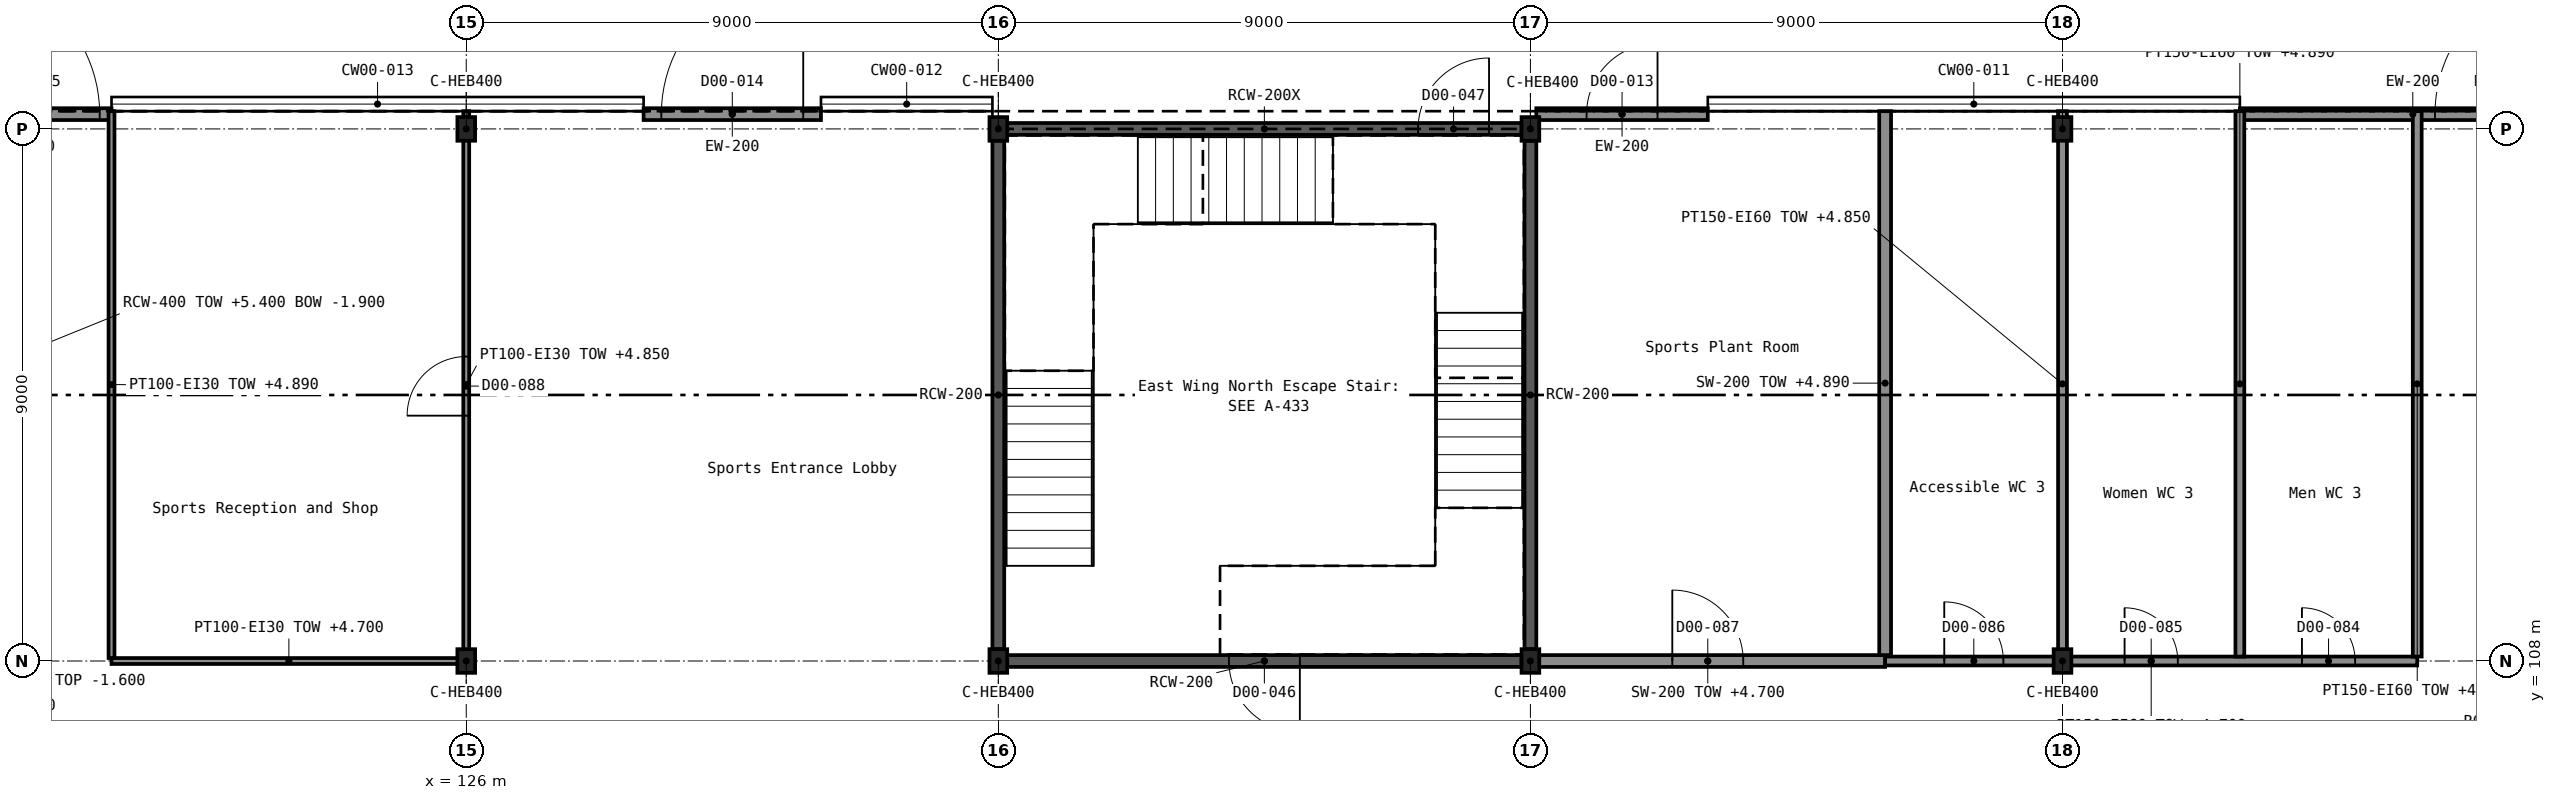
"""IFC4 building model, lengths in metres.
Left out: names, types, materials, properties, quantities, classifications, styles, units other than length and angle.
Written with IfcOpenShell. Run it as: python <this file> out.ifc"""

import sys

from ifc_helpers import new_model, si_unit, direction, frame, frame_2d, origin, origin_2d, place, context, subcontext, project, spatial, rectangle, i_section, extrude, element, fill, save


model = new_model("IFC4")
c1 = context("Model", 3, precision=1e-05, world=origin(), true_north=direction((0.0, 1.0)))
c2 = subcontext(c1, "Body", "Model", "MODEL_VIEW")
j1 = project(units=[si_unit("LENGTHUNIT", "METRE"), si_unit("PLANEANGLEUNIT", "RADIAN")], contexts=[c1])
p1 = place(None, origin())
s1 = spatial("IfcSite", under=j1, at=p1, CompositionType="ELEMENT")
p2 = place(p1, origin())
s2 = spatial("IfcBuilding", under=s1, at=p2, CompositionType="ELEMENT")
p3 = place(p2, origin())
s3 = spatial("IfcBuildingStorey", under=s2, at=p3, CompositionType="ELEMENT", Elevation=0.0)
for number, where, z_axis, x_axis in (
    (1, (126.0, 108.0, -0.3), (0.0, 0.0, 1.0), (1.0, 0.0, 0.0)),
    (2, (135.0, 108.0, -0.3), (0.0, 0.0, 1.0), (1.0, 0.0, 0.0)),
    (3, (144.0, 108.0, -0.3), (0.0, 0.0, 1.0), (1.0, 0.0, 0.0)),
    (4, (153.0, 108.0, -0.3), (0.0, 0.0, 1.0), (1.0, 0.0, 0.0)),
    (5, (126.0, 117.0, -0.3), (0.0, 0.0, 1.0), (1.0, 0.0, 0.0)),
    (6, (135.0, 117.0, -0.3), (0.0, 0.0, 1.0), (1.0, 0.0, 0.0)),
    (7, (144.0, 117.0, -0.3), (0.0, 0.0, 1.0), (1.0, 0.0, 0.0)),
    (8, (153.0, 117.0, -0.3), (0.0, 0.0, 1.0), (1.0, 0.0, 0.0)),
):
    element("IfcColumn", number, at=place(p3, frame(where, z_axis=z_axis, x_axis=x_axis)), inside=s3, PredefinedType="COLUMN", context=c2, shape_type="SweptSolid", body=[
        extrude(i_section(OverallWidth=0.3, OverallDepth=0.4, WebThickness=0.013, FlangeThickness=0.024, FilletRadius=0.027, at=origin_2d()), origin(), (0.0, 0.0, 1.0), 5.7),
    ])
p4 = place(p3, frame((161.85, 117.25, 0.0), z_axis=(0.0, 0.0, 1.0), x_axis=(-1.0, 0.0, 0.0)))
e9 = element("IfcWall", 9, at=p4, inside=s3, PredefinedType="SOLIDWALL", context=c2, shape_type="SweptSolid", body=[
    extrude(rectangle(XDim=5.85, YDim=0.2, at=frame_2d((2.925, 0.0))), origin(), (0.0, 0.0, 1.0), 5.4),
])
p5 = place(p4, frame((0.15, 0.0, 0.0)))
e10 = element("IfcOpeningElement", 10, at=p5, cuts=e9, PredefinedType="OPENING", context=c2, shape_type="SweptSolid", body=[
    extrude(rectangle(XDim=2.4, YDim=2.4, at=frame_2d((1.2, 1.2))), frame((0.0, 0.111, 0.0), z_axis=(0.0, -1.0, 0.0), x_axis=(1.0, 0.0, 0.0)), (0.0, 0.0, 1.0), 0.222),
])
p6 = place(p3, frame((147.0, 117.25, 0.0), z_axis=(0.0, 0.0, 1.0), x_axis=(-1.0, 0.0, 0.0)))
e11 = element("IfcWall", 11, at=p6, inside=s3, PredefinedType="SOLIDWALL", context=c2, shape_type="SweptSolid", body=[
    extrude(rectangle(XDim=2.9, YDim=0.2, at=frame_2d((1.45, 0.0))), origin(), (0.0, 0.0, 1.0), 5.4),
])
p7 = place(p6, frame((0.85, 0.0, 0.0)))
e12 = element("IfcOpeningElement", 12, at=p7, cuts=e11, PredefinedType="OPENING", context=c2, shape_type="SweptSolid", body=[
    extrude(rectangle(XDim=1.2, YDim=2.1, at=frame_2d((0.6, 1.05))), frame((0.0, 0.111, 0.0), z_axis=(0.0, -1.0, 0.0), x_axis=(1.0, 0.0, 0.0)), (0.0, 0.0, 1.0), 0.222),
])
p8 = place(p3, frame((132.0, 117.25, 0.0), z_axis=(0.0, 0.0, 1.0), x_axis=(-1.0, 0.0, 0.0)))
e13 = element("IfcWall", 13, at=p8, inside=s3, PredefinedType="SOLIDWALL", context=c2, shape_type="SweptSolid", body=[
    extrude(rectangle(XDim=3.0, YDim=0.2, at=frame_2d((1.5, 0.0))), origin(), (0.0, 0.0, 1.0), 5.4),
])
p9 = place(p8, frame((0.3, 0.0, 0.0)))
e14 = element("IfcOpeningElement", 14, at=p9, cuts=e13, PredefinedType="OPENING", context=c2, shape_type="SweptSolid", body=[
    extrude(rectangle(XDim=2.4, YDim=2.4, at=frame_2d((1.2, 1.2))), frame((0.0, 0.111, 0.0), z_axis=(0.0, -1.0, 0.0), x_axis=(1.0, 0.0, 0.0)), (0.0, 0.0, 1.0), 0.222),
])
p10 = place(p3, frame((120.0, 117.25, 0.0), z_axis=(0.0, 0.0, 1.0), x_axis=(-1.0, 0.0, 0.0)))
e15 = element("IfcWall", 15, at=p10, inside=s3, PredefinedType="SOLIDWALL", context=c2, shape_type="SweptSolid", body=[
    extrude(rectangle(XDim=2.8, YDim=0.2, at=frame_2d((1.4, 0.0))), origin(), (0.0, 0.0, 1.0), 5.4),
])
p11 = place(p10, frame((0.2, 0.0, 0.0)))
e16 = element("IfcOpeningElement", 16, at=p11, cuts=e15, PredefinedType="OPENING", context=c2, shape_type="SweptSolid", body=[
    extrude(rectangle(XDim=2.4, YDim=2.4, at=frame_2d((1.2, 1.2))), frame((0.0, 0.111, 0.0), z_axis=(0.0, -1.0, 0.0), x_axis=(1.0, 0.0, 0.0)), (0.0, 0.0, 1.0), 0.222),
])
p12 = place(p3, frame((135.15, 108.0, 0.0), z_axis=(0.0, 0.0, 1.0), x_axis=(1.0, 0.0, 0.0)))
e17 = element("IfcWall", 17, at=p12, inside=s3, PredefinedType="SHEAR", context=c2, shape_type="SweptSolid", body=[
    extrude(rectangle(XDim=8.7, YDim=0.2, at=frame_2d((4.35, 0.0))), origin(), (0.0, 0.0, 1.0), 5.4),
])
p13 = place(p12, frame((3.75, 0.0, 0.0)))
e18 = element("IfcOpeningElement", 18, at=p13, cuts=e17, PredefinedType="OPENING", context=c2, shape_type="SweptSolid", body=[
    extrude(rectangle(XDim=1.2, YDim=2.1, at=frame_2d((0.6, 1.05))), frame((0.0, 0.111, 0.0), z_axis=(0.0, -1.0, 0.0), x_axis=(1.0, 0.0, 0.0)), (0.0, 0.0, 1.0), 0.222),
])
p14 = place(p3, frame((135.15, 117.0, 0.0), z_axis=(0.0, 0.0, 1.0), x_axis=(1.0, 0.0, 0.0)))
e19 = element("IfcWall", 19, at=p14, inside=s3, PredefinedType="SHEAR", context=c2, shape_type="SweptSolid", body=[
    extrude(rectangle(XDim=8.7, YDim=0.2, at=frame_2d((4.35, 0.0))), origin(), (0.0, 0.0, 1.0), 5.4),
])
p15 = place(p14, frame((6.95, 0.0, 0.0)))
e20 = element("IfcOpeningElement", 20, at=p15, cuts=e19, PredefinedType="OPENING", context=c2, shape_type="SweptSolid", body=[
    extrude(rectangle(XDim=1.2, YDim=2.1, at=frame_2d((0.6, 1.05))), frame((0.0, 0.111, 0.0), z_axis=(0.0, -1.0, 0.0), x_axis=(1.0, 0.0, 0.0)), (0.0, 0.0, 1.0), 0.222),
])
for number, where, z_axis, x_axis in (
    (21, (135.0, 108.2, 0.0), (0.0, 0.0, 1.0), (0.0, 1.0, 0.0)),
    (22, (144.0, 108.2, 0.0), (0.0, 0.0, 1.0), (0.0, 1.0, 0.0)),
):
    element("IfcWall", number, at=place(p3, frame(where, z_axis=z_axis, x_axis=x_axis)), inside=s3, PredefinedType="SHEAR", context=c2, shape_type="SweptSolid", body=[
        extrude(rectangle(XDim=8.6, YDim=0.2, at=frame_2d((4.3, 0.0))), origin(), (0.0, 0.0, 1.0), 5.4),
    ])
p16 = place(p3, frame((144.0, 108.0, 0.0), z_axis=(0.0, 0.0, 1.0), x_axis=(1.0, 0.0, 0.0)))
e23 = element("IfcWall", 23, at=p16, inside=s3, PredefinedType="SOLIDWALL", context=c2, shape_type="SweptSolid", body=[
    extrude(rectangle(XDim=6.0, YDim=0.2, at=frame_2d((3.0, 0.0))), origin(), (0.0, 0.0, 1.0), 4.7),
])
p17 = place(p16, frame((2.4, 0.0, 0.0)))
e24 = element("IfcOpeningElement", 24, at=p17, cuts=e23, PredefinedType="OPENING", context=c2, shape_type="SweptSolid", body=[
    extrude(rectangle(XDim=1.2, YDim=2.4, at=frame_2d((0.6, 1.2))), frame((0.0, 0.111, 0.0), z_axis=(0.0, -1.0, 0.0), x_axis=(1.0, 0.0, 0.0)), (0.0, 0.0, 1.0), 0.222),
])
p18 = place(p3, frame((150.0, 108.1, 0.0), z_axis=(0.0, 0.0, 1.0), x_axis=(0.0, 1.0, 0.0)))
e25 = element("IfcWall", 25, at=p18, inside=s3, PredefinedType="SOLIDWALL", context=c2, shape_type="SweptSolid", body=[
    extrude(rectangle(XDim=9.2, YDim=0.2, at=frame_2d((4.6, 0.0))), origin(), (0.0, 0.0, 1.0), 4.89),
])
p19 = place(p3, frame((150.0, 108.0, 0.0), z_axis=(0.0, 0.0, 1.0), x_axis=(1.0, 0.0, 0.0)))
e26 = element("IfcWall", 26, at=p19, inside=s3, PredefinedType="PARTITIONING", context=c2, shape_type="SweptSolid", body=[
    extrude(rectangle(XDim=9.0, YDim=0.15, at=frame_2d((4.5, 0.0))), origin(), (0.0, 0.0, 1.0), 4.7),
])
p20 = place(p19, frame((7.05, 0.0, 0.0)))
e27 = element("IfcOpeningElement", 27, at=p20, cuts=e26, PredefinedType="OPENING", context=c2, shape_type="SweptSolid", body=[
    extrude(rectangle(XDim=0.9, YDim=2.1, at=frame_2d((0.45, 1.05))), frame((0.0, 0.086, 0.0), z_axis=(0.0, -1.0, 0.0), x_axis=(1.0, 0.0, 0.0)), (0.0, 0.0, 1.0), 0.172),
])
p21 = place(p19, frame((4.05, 0.0, 0.0)))
e28 = element("IfcOpeningElement", 28, at=p21, cuts=e26, PredefinedType="OPENING", context=c2, shape_type="SweptSolid", body=[
    extrude(rectangle(XDim=0.9, YDim=2.1, at=frame_2d((0.45, 1.05))), frame((0.0, 0.086, 0.0), z_axis=(0.0, -1.0, 0.0), x_axis=(1.0, 0.0, 0.0)), (0.0, 0.0, 1.0), 0.172),
])
p22 = place(p19, frame((1.0, 0.0, 0.0)))
e29 = element("IfcOpeningElement", 29, at=p22, cuts=e26, PredefinedType="OPENING", context=c2, shape_type="SweptSolid", body=[
    extrude(rectangle(XDim=1.0, YDim=2.1, at=frame_2d((0.5, 1.05))), frame((0.0, 0.086, 0.0), z_axis=(0.0, -1.0, 0.0), x_axis=(1.0, 0.0, 0.0)), (0.0, 0.0, 1.0), 0.172),
])
p23 = place(p3, frame((153.0, 108.075, 0.0), z_axis=(0.0, 0.0, 1.0), x_axis=(0.0, 1.0, 0.0)))
e30 = element("IfcWall", 30, at=p23, inside=s3, PredefinedType="PARTITIONING", context=c2, shape_type="SweptSolid", body=[
    extrude(rectangle(XDim=9.225, YDim=0.15, at=frame_2d((4.613, 0.0))), origin(), (0.0, 0.0, 1.0), 4.85),
])
for number, where, z_axis, x_axis in (
    (31, (156.0, 108.075, 0.0), (0.0, 0.0, 1.0), (0.0, 1.0, 0.0)),
    (32, (159.0, 108.075, 0.0), (0.0, 0.0, 1.0), (0.0, 1.0, 0.0)),
):
    element("IfcWall", number, at=place(p3, frame(where, z_axis=z_axis, x_axis=x_axis)), inside=s3, PredefinedType="PARTITIONING", context=c2, shape_type="SweptSolid", body=[
        extrude(rectangle(XDim=9.225, YDim=0.15, at=frame_2d((4.613, 0.0))), origin(), (0.0, 0.0, 1.0), 4.89),
    ])
p24 = place(p3, frame((120.0, 108.0, 0.0), z_axis=(0.0, 0.0, 1.0), x_axis=(1.0, 0.0, 0.0)))
e33 = element("IfcWall", 33, at=p24, inside=s3, PredefinedType="PARTITIONING", context=c2, shape_type="SweptSolid", body=[
    extrude(rectangle(XDim=6.0, YDim=0.1, at=frame_2d((3.0, 0.0))), origin(), (0.0, 0.0, 1.0), 4.7),
])
p25 = place(p3, frame((120.0, 108.05, 0.0), z_axis=(0.0, 0.0, 1.0), x_axis=(0.0, 1.0, 0.0)))
e34 = element("IfcWall", 34, at=p25, inside=s3, PredefinedType="PARTITIONING", context=c2, shape_type="SweptSolid", body=[
    extrude(rectangle(XDim=9.25, YDim=0.1, at=frame_2d((4.625, 0.0))), origin(), (0.0, 0.0, 1.0), 4.89),
])
p26 = place(p3, frame((126.0, 108.05, 0.0), z_axis=(0.0, 0.0, 1.0), x_axis=(0.0, 1.0, 0.0)))
e35 = element("IfcWall", 35, at=p26, inside=s3, PredefinedType="PARTITIONING", context=c2, shape_type="SweptSolid", body=[
    extrude(rectangle(XDim=9.25, YDim=0.1, at=frame_2d((4.625, 0.0))), origin(), (0.0, 0.0, 1.0), 4.85),
])
p27 = place(p26, frame((4.1, 0.0, 0.0)))
e36 = element("IfcOpeningElement", 36, at=p27, cuts=e35, PredefinedType="OPENING", context=c2, shape_type="SweptSolid", body=[
    extrude(rectangle(XDim=1.0, YDim=2.4, at=frame_2d((0.5, 1.2))), frame((0.0, 0.061, 0.0), z_axis=(0.0, -1.0, 0.0), x_axis=(1.0, 0.0, 0.0)), (0.0, 0.0, 1.0), 0.122),
])
p28 = place(p5, frame((2.4, 0.0, 0.0), z_axis=(0.0, 0.0, 1.0), x_axis=(-1.0, 0.0, 0.0)))
e37 = element("IfcDoor", 37, at=p28, inside=s3, OperationType="DOUBLE_DOOR_DOUBLE_SWING", PredefinedType="DOOR", context=c2, shape_type="SweptSolid", body=[
    extrude(rectangle(XDim=2.4, YDim=2.4, at=frame_2d((1.2, 1.2))), frame((0.0, 0.025, 0.0), z_axis=(0.0, -1.0, 0.0), x_axis=(1.0, 0.0, 0.0)), (0.0, 0.0, 1.0), 0.05),
])
fill(e10, e37)
p29 = place(p7, frame((1.2, 0.0, 0.0), z_axis=(0.0, 0.0, 1.0), x_axis=(-1.0, 0.0, 0.0)))
e38 = element("IfcDoor", 38, at=p29, inside=s3, OperationType="SINGLE_SWING_RIGHT", PredefinedType="DOOR", context=c2, shape_type="SweptSolid", body=[
    extrude(rectangle(XDim=1.2, YDim=2.1, at=frame_2d((0.6, 1.05))), frame((0.0, 0.025, 0.0), z_axis=(0.0, -1.0, 0.0), x_axis=(1.0, 0.0, 0.0)), (0.0, 0.0, 1.0), 0.05),
])
fill(e12, e38)
p30 = place(p9, frame((2.4, 0.0, 0.0), z_axis=(0.0, 0.0, 1.0), x_axis=(-1.0, 0.0, 0.0)))
e39 = element("IfcDoor", 39, at=p30, inside=s3, OperationType="DOUBLE_DOOR_DOUBLE_SWING", PredefinedType="DOOR", context=c2, shape_type="SweptSolid", body=[
    extrude(rectangle(XDim=2.4, YDim=2.4, at=frame_2d((1.2, 1.2))), frame((0.0, 0.025, 0.0), z_axis=(0.0, -1.0, 0.0), x_axis=(1.0, 0.0, 0.0)), (0.0, 0.0, 1.0), 0.05),
])
fill(e14, e39)
p31 = place(p11, frame((2.4, 0.0, 0.0), z_axis=(0.0, 0.0, 1.0), x_axis=(-1.0, 0.0, 0.0)))
e40 = element("IfcDoor", 40, at=p31, inside=s3, OperationType="DOUBLE_DOOR_DOUBLE_SWING", PredefinedType="DOOR", context=c2, shape_type="SweptSolid", body=[
    extrude(rectangle(XDim=2.4, YDim=2.4, at=frame_2d((1.2, 1.2))), frame((0.0, 0.025, 0.0), z_axis=(0.0, -1.0, 0.0), x_axis=(1.0, 0.0, 0.0)), (0.0, 0.0, 1.0), 0.05),
])
fill(e16, e40)
p32 = place(p13, frame((1.2, 0.0, 0.0), z_axis=(0.0, 0.0, 1.0), x_axis=(-1.0, 0.0, 0.0)))
e41 = element("IfcDoor", 41, at=p32, inside=s3, OperationType="SINGLE_SWING_LEFT", PredefinedType="DOOR", context=c2, shape_type="SweptSolid", body=[
    extrude(rectangle(XDim=1.2, YDim=2.1, at=frame_2d((0.6, 1.05))), frame((0.0, 0.025, 0.0), z_axis=(0.0, -1.0, 0.0), x_axis=(1.0, 0.0, 0.0)), (0.0, 0.0, 1.0), 0.05),
])
fill(e18, e41)
p33 = place(p15, origin())
e42 = element("IfcDoor", 42, at=p33, inside=s3, OperationType="SINGLE_SWING_RIGHT", PredefinedType="DOOR", context=c2, shape_type="SweptSolid", body=[
    extrude(rectangle(XDim=1.2, YDim=2.1, at=frame_2d((0.6, 1.05))), frame((0.0, 0.025, 0.0), z_axis=(0.0, -1.0, 0.0), x_axis=(1.0, 0.0, 0.0)), (0.0, 0.0, 1.0), 0.05),
])
fill(e20, e42)
p34 = place(p20, origin())
e43 = element("IfcDoor", 43, at=p34, inside=s3, OperationType="SINGLE_SWING_LEFT", PredefinedType="DOOR", context=c2, shape_type="SweptSolid", body=[
    extrude(rectangle(XDim=0.9, YDim=2.1, at=frame_2d((0.45, 1.05))), frame((0.0, 0.025, 0.0), z_axis=(0.0, -1.0, 0.0), x_axis=(1.0, 0.0, 0.0)), (0.0, 0.0, 1.0), 0.05),
])
fill(e27, e43)
p35 = place(p21, origin())
e44 = element("IfcDoor", 44, at=p35, inside=s3, OperationType="SINGLE_SWING_LEFT", PredefinedType="DOOR", context=c2, shape_type="SweptSolid", body=[
    extrude(rectangle(XDim=0.9, YDim=2.1, at=frame_2d((0.45, 1.05))), frame((0.0, 0.025, 0.0), z_axis=(0.0, -1.0, 0.0), x_axis=(1.0, 0.0, 0.0)), (0.0, 0.0, 1.0), 0.05),
])
fill(e28, e44)
p36 = place(p22, origin())
e45 = element("IfcDoor", 45, at=p36, inside=s3, OperationType="SINGLE_SWING_LEFT", PredefinedType="DOOR", context=c2, shape_type="SweptSolid", body=[
    extrude(rectangle(XDim=1.0, YDim=2.1, at=frame_2d((0.5, 1.05))), frame((0.0, 0.025, 0.0), z_axis=(0.0, -1.0, 0.0), x_axis=(1.0, 0.0, 0.0)), (0.0, 0.0, 1.0), 0.05),
])
fill(e29, e45)
p37 = place(p17, origin())
e46 = element("IfcDoor", 46, at=p37, inside=s3, OperationType="SINGLE_SWING_LEFT", PredefinedType="DOOR", context=c2, shape_type="SweptSolid", body=[
    extrude(rectangle(XDim=1.2, YDim=2.4, at=frame_2d((0.6, 1.2))), frame((0.0, 0.025, 0.0), z_axis=(0.0, -1.0, 0.0), x_axis=(1.0, 0.0, 0.0)), (0.0, 0.0, 1.0), 0.05),
])
fill(e24, e46)
p38 = place(p27, origin())
e47 = element("IfcDoor", 47, at=p38, inside=s3, OperationType="SINGLE_SWING_LEFT", PredefinedType="DOOR", context=c2, shape_type="SweptSolid", body=[
    extrude(rectangle(XDim=1.0, YDim=2.4, at=frame_2d((0.5, 1.2))), frame((0.0, 0.025, 0.0), z_axis=(0.0, -1.0, 0.0), x_axis=(1.0, 0.0, 0.0)), (0.0, 0.0, 1.0), 0.05),
])
fill(e36, e47)
save(model, sys.argv[1])
